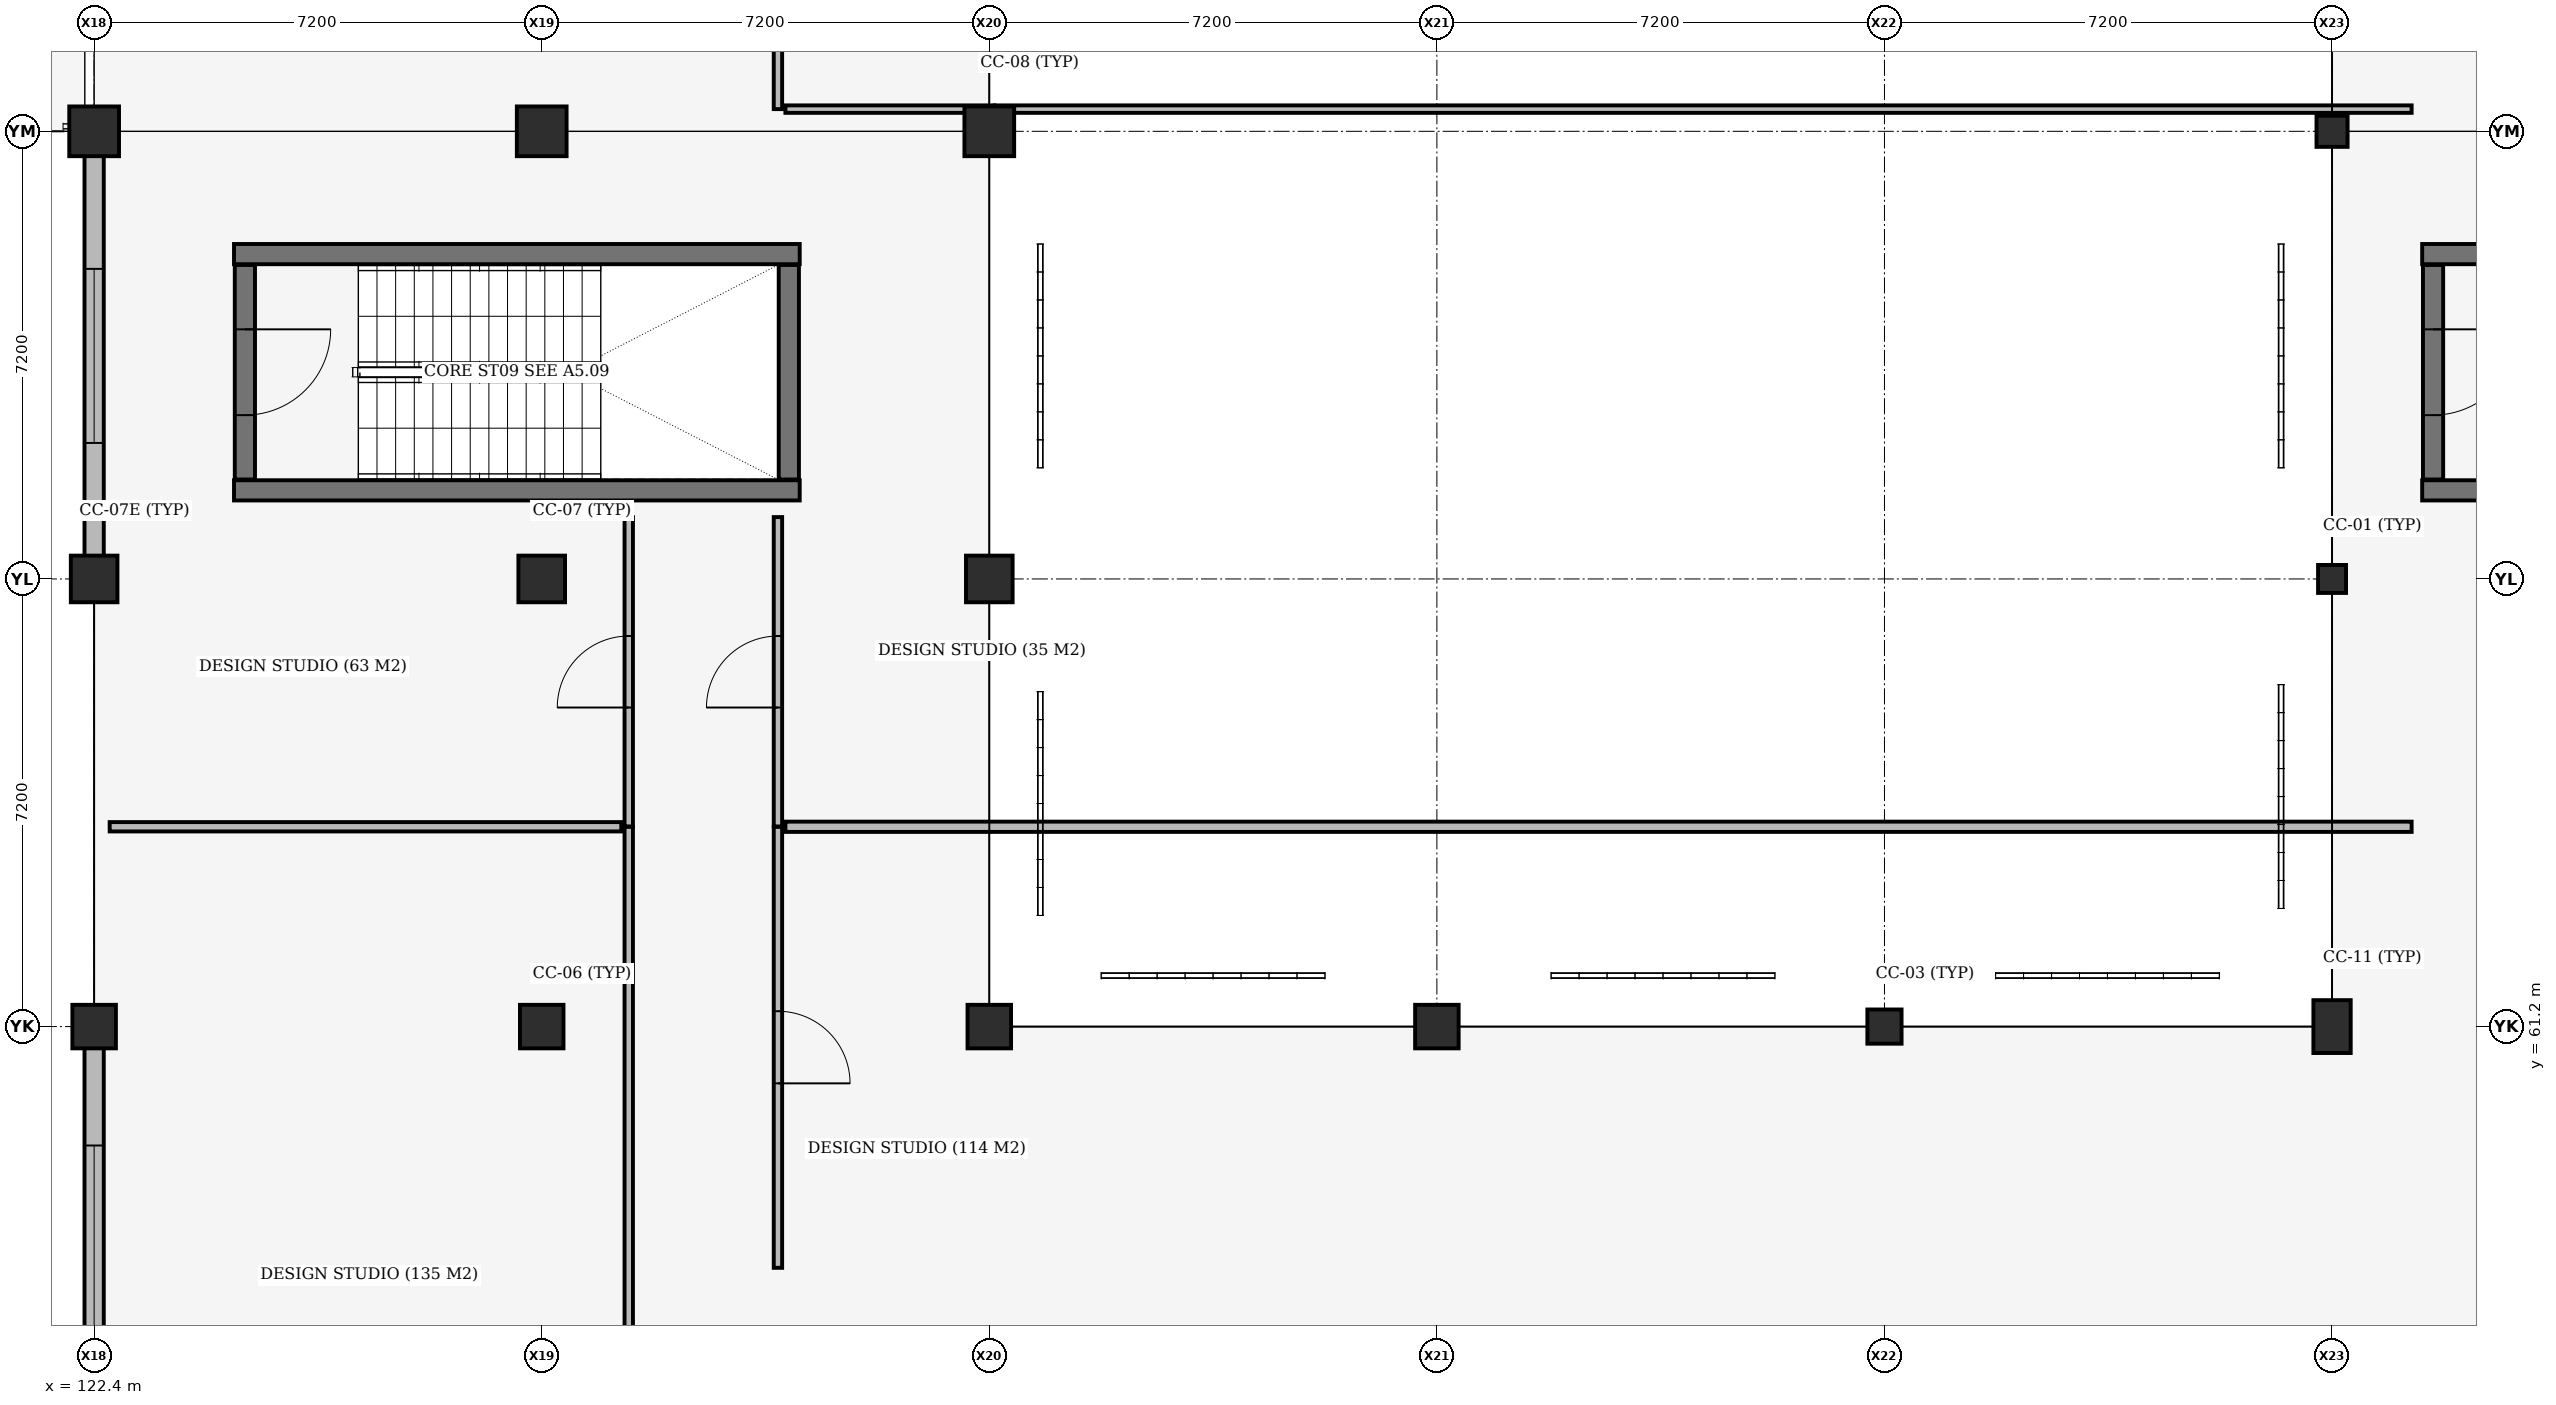
"""IFC4 building model, lengths in metres.
Left out: names, types, materials, properties, quantities, classifications, styles, units other than length and angle.
Written with IfcOpenShell. Run it as: python <this file> out.ifc"""

import sys

from ifc_helpers import new_model, si_unit, direction, frame, frame_2d, origin, origin_2d, place, context, subcontext, project, spatial, rectangle, extrude, element, fill, save


model = new_model("IFC4")
c1 = context("Model", 3, precision=1e-05, world=origin(), true_north=direction((0.0, 1.0)))
c2 = subcontext(c1, "Body", "Model", "MODEL_VIEW")
j1 = project(units=[si_unit("LENGTHUNIT", "METRE"), si_unit("PLANEANGLEUNIT", "RADIAN")], contexts=[c1])
p1 = place(None, origin())
s1 = spatial("IfcSite", under=j1, at=p1, CompositionType="ELEMENT")
p2 = place(p1, origin())
s2 = spatial("IfcBuilding", under=s1, at=p2, CompositionType="ELEMENT")
p3 = place(p2, frame((0.0, 0.0, 5.4)))
s3 = spatial("IfcBuildingStorey", under=s2, at=p3, CompositionType="ELEMENT", Elevation=5.4)
p4 = place(p3, frame((122.4, 61.2, 0.0), z_axis=(0.0, 0.0, 1.0), x_axis=(1.0, 0.0, 0.0)))
e1 = element("IfcColumn", 1, at=p4, inside=s3, PredefinedType="COLUMN", context=c2, shape_type="SweptSolid", body=[
    extrude(rectangle(XDim=0.7, YDim=0.7, at=origin_2d()), origin(), (0.0, 0.0, 1.0), 3.92),
])
p5 = place(p3, frame((122.4, 68.4, 0.0), z_axis=(0.0, 0.0, 1.0), x_axis=(1.0, 0.0, 0.0)))
e2 = element("IfcColumn", 2, at=p5, inside=s3, PredefinedType="COLUMN", context=c2, shape_type="SweptSolid", body=[
    extrude(rectangle(XDim=0.75, YDim=0.75, at=origin_2d()), origin(), (0.0, 0.0, 1.0), 3.92),
])
p6 = place(p3, frame((122.4, 75.6, 0.0), z_axis=(0.0, 0.0, 1.0), x_axis=(1.0, 0.0, 0.0)))
e3 = element("IfcColumn", 3, at=p6, inside=s3, PredefinedType="COLUMN", context=c2, shape_type="SweptSolid", body=[
    extrude(rectangle(XDim=0.8, YDim=0.8, at=origin_2d()), origin(), (0.0, 0.0, 1.0), 3.92),
])
p7 = place(p3, frame((129.6, 61.2, 0.0), z_axis=(0.0, 0.0, 1.0), x_axis=(1.0, 0.0, 0.0)))
e4 = element("IfcColumn", 4, at=p7, inside=s3, PredefinedType="COLUMN", context=c2, shape_type="SweptSolid", body=[
    extrude(rectangle(XDim=0.7, YDim=0.7, at=origin_2d()), origin(), (0.0, 0.0, 1.0), 3.92),
])
p8 = place(p3, frame((129.6, 68.4, 0.0), z_axis=(0.0, 0.0, 1.0), x_axis=(1.0, 0.0, 0.0)))
e5 = element("IfcColumn", 5, at=p8, inside=s3, PredefinedType="COLUMN", context=c2, shape_type="SweptSolid", body=[
    extrude(rectangle(XDim=0.75, YDim=0.75, at=origin_2d()), origin(), (0.0, 0.0, 1.0), 3.92),
])
p9 = place(p3, frame((129.6, 75.6, 0.0), z_axis=(0.0, 0.0, 1.0), x_axis=(1.0, 0.0, 0.0)))
e6 = element("IfcColumn", 6, at=p9, inside=s3, PredefinedType="COLUMN", context=c2, shape_type="SweptSolid", body=[
    extrude(rectangle(XDim=0.8, YDim=0.8, at=origin_2d()), origin(), (0.0, 0.0, 1.0), 3.92),
])
p10 = place(p3, frame((136.8, 61.2, 0.0), z_axis=(0.0, 0.0, 1.0), x_axis=(1.0, 0.0, 0.0)))
e7 = element("IfcColumn", 7, at=p10, inside=s3, PredefinedType="COLUMN", context=c2, shape_type="SweptSolid", body=[
    extrude(rectangle(XDim=0.7, YDim=0.7, at=origin_2d()), origin(), (0.0, 0.0, 1.0), 3.92),
])
p11 = place(p3, frame((136.8, 68.4, 0.0), z_axis=(0.0, 0.0, 1.0), x_axis=(1.0, 0.0, 0.0)))
e8 = element("IfcColumn", 8, at=p11, inside=s3, PredefinedType="COLUMN", context=c2, shape_type="SweptSolid", body=[
    extrude(rectangle(XDim=0.75, YDim=0.75, at=origin_2d()), origin(), (0.0, 0.0, 1.0), 3.92),
])
p12 = place(p3, frame((136.8, 75.6, 0.0), z_axis=(0.0, 0.0, 1.0), x_axis=(1.0, 0.0, 0.0)))
e9 = element("IfcColumn", 9, at=p12, inside=s3, PredefinedType="COLUMN", context=c2, shape_type="SweptSolid", body=[
    extrude(rectangle(XDim=0.8, YDim=0.8, at=origin_2d()), origin(), (0.0, 0.0, 1.0), 3.92),
])
p13 = place(p3, frame((144.0, 61.2, 0.0), z_axis=(0.0, 0.0, 1.0), x_axis=(1.0, 0.0, 0.0)))
e10 = element("IfcColumn", 10, at=p13, inside=s3, PredefinedType="COLUMN", context=c2, shape_type="SweptSolid", body=[
    extrude(rectangle(XDim=0.7, YDim=0.7, at=origin_2d()), origin(), (0.0, 0.0, 1.0), 3.92),
])
p14 = place(p3, frame((151.2, 61.2, 0.0), z_axis=(0.0, 0.0, 1.0), x_axis=(1.0, 0.0, 0.0)))
e11 = element("IfcColumn", 11, at=p14, inside=s3, PredefinedType="COLUMN", context=c2, shape_type="SweptSolid", body=[
    extrude(rectangle(XDim=0.55, YDim=0.55, at=origin_2d()), origin(), (0.0, 0.0, 1.0), 3.92),
])
p15 = place(p3, frame((158.4, 61.2, 0.0), z_axis=(0.0, 0.0, 1.0), x_axis=(1.0, 0.0, 0.0)))
e12 = element("IfcColumn", 12, at=p15, inside=s3, PredefinedType="COLUMN", context=c2, shape_type="SweptSolid", body=[
    extrude(rectangle(XDim=0.6, YDim=0.85, at=origin_2d()), origin(), (0.0, 0.0, 1.0), 3.92),
])
p16 = place(p3, frame((158.4, 68.4, 0.0), z_axis=(0.0, 0.0, 1.0), x_axis=(1.0, 0.0, 0.0)))
e13 = element("IfcColumn", 13, at=p16, inside=s3, PredefinedType="COLUMN", context=c2, shape_type="SweptSolid", body=[
    extrude(rectangle(XDim=0.45, YDim=0.45, at=origin_2d()), origin(), (0.0, 0.0, 1.0), 3.92),
])
p17 = place(p3, frame((158.4, 75.6, 0.0), z_axis=(0.0, 0.0, 1.0), x_axis=(1.0, 0.0, 0.0)))
e14 = element("IfcColumn", 14, at=p17, inside=s3, PredefinedType="COLUMN", context=c2, shape_type="SweptSolid", body=[
    extrude(rectangle(XDim=0.5, YDim=0.5, at=origin_2d()), origin(), (0.0, 0.0, 1.0), 3.92),
])
for number, where, z_axis, x_axis in (
    (15, (124.65, 69.825, 0.0), (0.0, 0.0, 1.0), (1.0, 0.0, 0.0)),
    (16, (133.75, 73.625, 0.0), (0.0, 0.0, 1.0), (-1.0, 0.0, 0.0)),
):
    element("IfcWall", number, at=place(p3, frame(where, z_axis=z_axis, x_axis=x_axis)), inside=s3, PredefinedType="SHEAR", context=c2, shape_type="SweptSolid", body=[
        extrude(rectangle(XDim=9.1, YDim=0.325, at=frame_2d((4.55, 0.0))), origin(), (0.0, 0.0, 1.0), 3.92),
    ])
p18 = place(p3, frame((133.575, 70.0, 0.0), z_axis=(0.0, 0.0, 1.0), x_axis=(0.0, 1.0, 0.0)))
e17 = element("IfcWall", 17, at=p18, inside=s3, PredefinedType="SHEAR", context=c2, shape_type="SweptSolid", body=[
    extrude(rectangle(XDim=3.45, YDim=0.325, at=frame_2d((1.725, 0.0))), origin(), (0.0, 0.0, 1.0), 3.92),
])
for number, where, z_axis, x_axis in (
    (18, (159.85, 69.825, 0.0), (0.0, 0.0, 1.0), (1.0, 0.0, 0.0)),
    (19, (168.95, 73.625, 0.0), (0.0, 0.0, 1.0), (-1.0, 0.0, 0.0)),
):
    element("IfcWall", number, at=place(p3, frame(where, z_axis=z_axis, x_axis=x_axis)), inside=s3, PredefinedType="SHEAR", context=c2, shape_type="SweptSolid", body=[
        extrude(rectangle(XDim=9.1, YDim=0.325, at=frame_2d((4.55, 0.0))), origin(), (0.0, 0.0, 1.0), 3.92),
    ])
p19 = place(p3, frame((122.4, 54.317, 0.0), z_axis=(0.0, 0.0, 1.0), x_axis=(0.0, 1.0, 0.0)))
e20 = element("IfcWall", 20, at=p19, inside=s3, PredefinedType="STANDARD", context=c2, shape_type="SweptSolid", body=[
    extrude(rectangle(XDim=6.541, YDim=0.31, at=frame_2d((3.271, 0.0))), origin(), (0.0, 0.0, 1.0), 3.24),
])
p20 = place(p19, frame((1.571, 0.0, 0.9)))
e21 = element("IfcOpeningElement", 21, at=p20, cuts=e20, PredefinedType="OPENING", context=c2, shape_type="SweptSolid", body=[
    extrude(rectangle(XDim=3.4, YDim=1.5, at=frame_2d((1.7, 0.75))), frame((0.0, 0.165, 0.0), z_axis=(0.0, -1.0, 0.0), x_axis=(1.0, 0.0, 0.0)), (0.0, 0.0, 1.0), 0.33),
])
p21 = place(p3, frame((122.4, 68.767, 0.0), z_axis=(0.0, 0.0, 1.0), x_axis=(0.0, 1.0, 0.0)))
e22 = element("IfcWall", 22, at=p21, inside=s3, PredefinedType="STANDARD", context=c2, shape_type="SweptSolid", body=[
    extrude(rectangle(XDim=6.441, YDim=0.31, at=frame_2d((3.22, 0.0))), origin(), (0.0, 0.0, 1.0), 3.4),
])
p22 = place(p21, frame((1.821, 0.0, 0.85)))
e23 = element("IfcOpeningElement", 23, at=p22, cuts=e22, PredefinedType="OPENING", context=c2, shape_type="SweptSolid", body=[
    extrude(rectangle(XDim=2.8, YDim=2.4, at=frame_2d((1.4, 1.2))), frame((0.0, 0.165, 0.0), z_axis=(0.0, -1.0, 0.0), x_axis=(1.0, 0.0, 0.0)), (0.0, 0.0, 1.0), 0.33),
])
p23 = place(p3, frame((124.825, 73.45, 0.0), z_axis=(0.0, 0.0, 1.0), x_axis=(0.0, -1.0, 0.0)))
e24 = element("IfcWall", 24, at=p23, inside=s3, PredefinedType="SHEAR", context=c2, shape_type="SweptSolid", body=[
    extrude(rectangle(XDim=3.45, YDim=0.325, at=frame_2d((1.725, 0.0))), origin(), (0.0, 0.0, 1.0), 3.92),
])
p24 = place(p23, frame((1.035, 0.0, 0.0)))
e25 = element("IfcOpeningElement", 25, at=p24, cuts=e24, PredefinedType="OPENING", context=c2, shape_type="SweptSolid", body=[
    extrude(rectangle(XDim=1.38, YDim=2.2, at=frame_2d((0.69, 1.1))), frame((0.0, 0.172, 0.0), z_axis=(0.0, -1.0, 0.0), x_axis=(1.0, 0.0, 0.0)), (0.0, 0.0, 1.0), 0.345),
])
p25 = place(p3, frame((160.025, 73.45, 0.0), z_axis=(0.0, 0.0, 1.0), x_axis=(0.0, -1.0, 0.0)))
e26 = element("IfcWall", 26, at=p25, inside=s3, PredefinedType="SHEAR", context=c2, shape_type="SweptSolid", body=[
    extrude(rectangle(XDim=3.45, YDim=0.325, at=frame_2d((1.725, 0.0))), origin(), (0.0, 0.0, 1.0), 3.92),
])
p26 = place(p25, frame((1.035, 0.0, 0.0)))
e27 = element("IfcOpeningElement", 27, at=p26, cuts=e26, PredefinedType="OPENING", context=c2, shape_type="SweptSolid", body=[
    extrude(rectangle(XDim=1.38, YDim=2.2, at=frame_2d((0.69, 1.1))), frame((0.0, 0.172, 0.0), z_axis=(0.0, -1.0, 0.0), x_axis=(1.0, 0.0, 0.0)), (0.0, 0.0, 1.0), 0.345),
])
p27 = place(p3, frame((131.0, 47.1, 0.0), z_axis=(0.0, 0.0, 1.0), x_axis=(0.0, 1.0, 0.0)))
e28 = element("IfcWall", 28, at=p27, inside=s3, PredefinedType="PARTITIONING", context=c2, shape_type="SweptSolid", body=[
    extrude(rectangle(XDim=17.314, YDim=0.135, at=frame_2d((8.657, 0.0))), origin(), (0.0, 0.0, 1.0), 3.18),
])
p28 = place(p27, frame((8.077, 0.0, 0.0)))
e29 = element("IfcOpeningElement", 29, at=p28, cuts=e28, PredefinedType="OPENING", context=c2, shape_type="SweptSolid", body=[
    extrude(rectangle(XDim=1.16, YDim=2.2, at=frame_2d((0.58, 1.1))), frame((0.0, 0.077, 0.0), z_axis=(0.0, -1.0, 0.0), x_axis=(1.0, 0.0, 0.0)), (0.0, 0.0, 1.0), 0.155),
])
p29 = place(p3, frame((122.65, 64.414, 0.0), z_axis=(0.0, 0.0, 1.0), x_axis=(1.0, 0.0, 0.0)))
e30 = element("IfcWall", 30, at=p29, inside=s3, PredefinedType="PARTITIONING", context=c2, shape_type="SweptSolid", body=[
    extrude(rectangle(XDim=8.23, YDim=0.15, at=frame_2d((4.115, 0.0))), origin(), (0.0, 0.0, 1.0), 3.24),
])
p30 = place(p3, frame((131.0, 64.419, 0.0), z_axis=(0.0, 0.0, 1.0), x_axis=(0.0, 1.0, 0.0)))
e31 = element("IfcWall", 31, at=p30, inside=s3, PredefinedType="PARTITIONING", context=c2, shape_type="SweptSolid", body=[
    extrude(rectangle(XDim=4.976, YDim=0.135, at=frame_2d((2.488, 0.0))), origin(), (0.0, 0.0, 1.0), 3.24),
])
p31 = place(p30, frame((1.913, 0.0, 0.0)))
e32 = element("IfcOpeningElement", 32, at=p31, cuts=e31, PredefinedType="OPENING", context=c2, shape_type="SweptSolid", body=[
    extrude(rectangle(XDim=1.15, YDim=2.2, at=frame_2d((0.575, 1.1))), frame((0.0, 0.077, 0.0), z_axis=(0.0, -1.0, 0.0), x_axis=(1.0, 0.0, 0.0)), (0.0, 0.0, 1.0), 0.155),
])
p32 = place(p3, frame((133.4, 57.32, 0.0), z_axis=(0.0, 0.0, 1.0), x_axis=(0.0, 1.0, 0.0)))
e33 = element("IfcWall", 33, at=p32, inside=s3, PredefinedType="PARTITIONING", context=c2, shape_type="SweptSolid", body=[
    extrude(rectangle(XDim=7.094, YDim=0.135, at=frame_2d((3.547, 0.0))), origin(), (0.0, 0.0, 1.0), 3.34),
])
p33 = place(p32, frame((2.967, 0.0, 0.0)))
e34 = element("IfcOpeningElement", 34, at=p33, cuts=e33, PredefinedType="OPENING", context=c2, shape_type="SweptSolid", body=[
    extrude(rectangle(XDim=1.16, YDim=2.2, at=frame_2d((0.58, 1.1))), frame((0.0, 0.077, 0.0), z_axis=(0.0, -1.0, 0.0), x_axis=(1.0, 0.0, 0.0)), (0.0, 0.0, 1.0), 0.155),
])
p34 = place(p3, frame((133.52, 64.414, 0.0), z_axis=(0.0, 0.0, 1.0), x_axis=(1.0, 0.0, 0.0)))
e35 = element("IfcWall", 35, at=p34, inside=s3, PredefinedType="PARTITIONING", context=c2, shape_type="SweptSolid", body=[
    extrude(rectangle(XDim=26.16, YDim=0.165, at=frame_2d((13.08, 0.0))), origin(), (0.0, 0.0, 1.0), 3.34),
])
p35 = place(p3, frame((133.4, 64.419, 0.0), z_axis=(0.0, 0.0, 1.0), x_axis=(0.0, 1.0, 0.0)))
e36 = element("IfcWall", 36, at=p35, inside=s3, PredefinedType="PARTITIONING", context=c2, shape_type="SweptSolid", body=[
    extrude(rectangle(XDim=4.976, YDim=0.135, at=frame_2d((2.488, 0.0))), origin(), (0.0, 0.0, 1.0), 3.24),
])
p36 = place(p35, frame((1.913, 0.0, 0.0)))
e37 = element("IfcOpeningElement", 37, at=p36, cuts=e36, PredefinedType="OPENING", context=c2, shape_type="SweptSolid", body=[
    extrude(rectangle(XDim=1.15, YDim=2.2, at=frame_2d((0.575, 1.1))), frame((0.0, 0.077, 0.0), z_axis=(0.0, -1.0, 0.0), x_axis=(1.0, 0.0, 0.0)), (0.0, 0.0, 1.0), 0.155),
])
p37 = place(p3, frame((133.52, 75.957, 0.0), z_axis=(0.0, 0.0, 1.0), x_axis=(1.0, 0.0, 0.0)))
e38 = element("IfcWall", 38, at=p37, inside=s3, PredefinedType="PARTITIONING", context=c2, shape_type="SweptSolid", body=[
    extrude(rectangle(XDim=3.36, YDim=0.12, at=frame_2d((1.68, 0.0))), origin(), (0.0, 0.0, 1.0), 3.24),
])
p38 = place(p3, frame((133.4, 75.957, 0.0), z_axis=(0.0, 0.0, 1.0), x_axis=(0.0, 1.0, 0.0)))
e39 = element("IfcWall", 39, at=p38, inside=s3, PredefinedType="PARTITIONING", context=c2, shape_type="SweptSolid", body=[
    extrude(rectangle(XDim=12.238, YDim=0.135, at=frame_2d((6.119, 0.0))), origin(), (0.0, 0.0, 1.0), 3.34),
])
p39 = place(p38, frame((5.539, 0.0, 0.0)))
e40 = element("IfcOpeningElement", 40, at=p39, cuts=e39, PredefinedType="OPENING", context=c2, shape_type="SweptSolid", body=[
    extrude(rectangle(XDim=1.16, YDim=2.2, at=frame_2d((0.58, 1.1))), frame((0.0, 0.077, 0.0), z_axis=(0.0, -1.0, 0.0), x_axis=(1.0, 0.0, 0.0)), (0.0, 0.0, 1.0), 0.155),
])
p40 = place(p3, frame((136.885, 75.957, 0.0), z_axis=(0.0, 0.0, 1.0), x_axis=(1.0, 0.0, 0.0)))
e41 = element("IfcWall", 41, at=p40, inside=s3, PredefinedType="PARTITIONING", context=c2, shape_type="SweptSolid", body=[
    extrude(rectangle(XDim=22.795, YDim=0.12, at=frame_2d((11.397, 0.0))), origin(), (0.0, 0.0, 1.0), 3.24),
])
p41 = place(p20, origin())
e42 = element("IfcWindow", 42, at=p41, inside=s3, PartitioningType="DOUBLE_PANEL_VERTICAL", PredefinedType="WINDOW", context=c2, shape_type="SweptSolid", body=[
    extrude(rectangle(XDim=3.4, YDim=1.5, at=frame_2d((1.7, 0.75))), frame((0.0, 0.03, 0.0), z_axis=(0.0, -1.0, 0.0), x_axis=(1.0, 0.0, 0.0)), (0.0, 0.0, 1.0), 0.06),
])
fill(e21, e42)
p42 = place(p22, origin())
e43 = element("IfcWindow", 43, at=p42, inside=s3, PartitioningType="DOUBLE_PANEL_VERTICAL", PredefinedType="WINDOW", context=c2, shape_type="SweptSolid", body=[
    extrude(rectangle(XDim=2.8, YDim=2.4, at=frame_2d((1.4, 1.2))), frame((0.0, 0.03, 0.0), z_axis=(0.0, -1.0, 0.0), x_axis=(1.0, 0.0, 0.0)), (0.0, 0.0, 1.0), 0.06),
])
fill(e23, e43)
p43 = place(p24, origin())
e44 = element("IfcDoor", 44, at=p43, inside=s3, OperationType="DOUBLE_DOOR_SINGLE_SWING", PredefinedType="DOOR", context=c2, shape_type="SweptSolid", body=[
    extrude(rectangle(XDim=1.38, YDim=2.2, at=frame_2d((0.69, 1.1))), frame((0.0, 0.025, 0.0), z_axis=(0.0, -1.0, 0.0), x_axis=(1.0, 0.0, 0.0)), (0.0, 0.0, 1.0), 0.05),
])
fill(e25, e44)
p44 = place(p26, origin())
e45 = element("IfcDoor", 45, at=p44, inside=s3, OperationType="DOUBLE_DOOR_SINGLE_SWING", PredefinedType="DOOR", context=c2, shape_type="SweptSolid", body=[
    extrude(rectangle(XDim=1.38, YDim=2.2, at=frame_2d((0.69, 1.1))), frame((0.0, 0.025, 0.0), z_axis=(0.0, -1.0, 0.0), x_axis=(1.0, 0.0, 0.0)), (0.0, 0.0, 1.0), 0.05),
])
fill(e27, e45)
p45 = place(p31, origin())
e46 = element("IfcDoor", 46, at=p45, inside=s3, OperationType="SINGLE_SWING_LEFT", PredefinedType="DOOR", context=c2, shape_type="SweptSolid", body=[
    extrude(rectangle(XDim=1.15, YDim=2.2, at=frame_2d((0.575, 1.1))), frame((0.0, 0.025, 0.0), z_axis=(0.0, -1.0, 0.0), x_axis=(1.0, 0.0, 0.0)), (0.0, 0.0, 1.0), 0.05),
])
fill(e32, e46)
p46 = place(p33, origin())
e47 = element("IfcDoor", 47, at=p46, inside=s3, OperationType="SINGLE_SWING_RIGHT", PredefinedType="DOOR", context=c2, shape_type="SweptSolid", body=[
    extrude(rectangle(XDim=1.16, YDim=2.2, at=frame_2d((0.58, 1.1))), frame((0.0, 0.025, 0.0), z_axis=(0.0, -1.0, 0.0), x_axis=(1.0, 0.0, 0.0)), (0.0, 0.0, 1.0), 0.05),
])
fill(e34, e47)
p47 = place(p36, origin())
e48 = element("IfcDoor", 48, at=p47, inside=s3, OperationType="SINGLE_SWING_LEFT", PredefinedType="DOOR", context=c2, shape_type="SweptSolid", body=[
    extrude(rectangle(XDim=1.15, YDim=2.2, at=frame_2d((0.575, 1.1))), frame((0.0, 0.025, 0.0), z_axis=(0.0, -1.0, 0.0), x_axis=(1.0, 0.0, 0.0)), (0.0, 0.0, 1.0), 0.05),
])
fill(e37, e48)
save(model, sys.argv[1])
